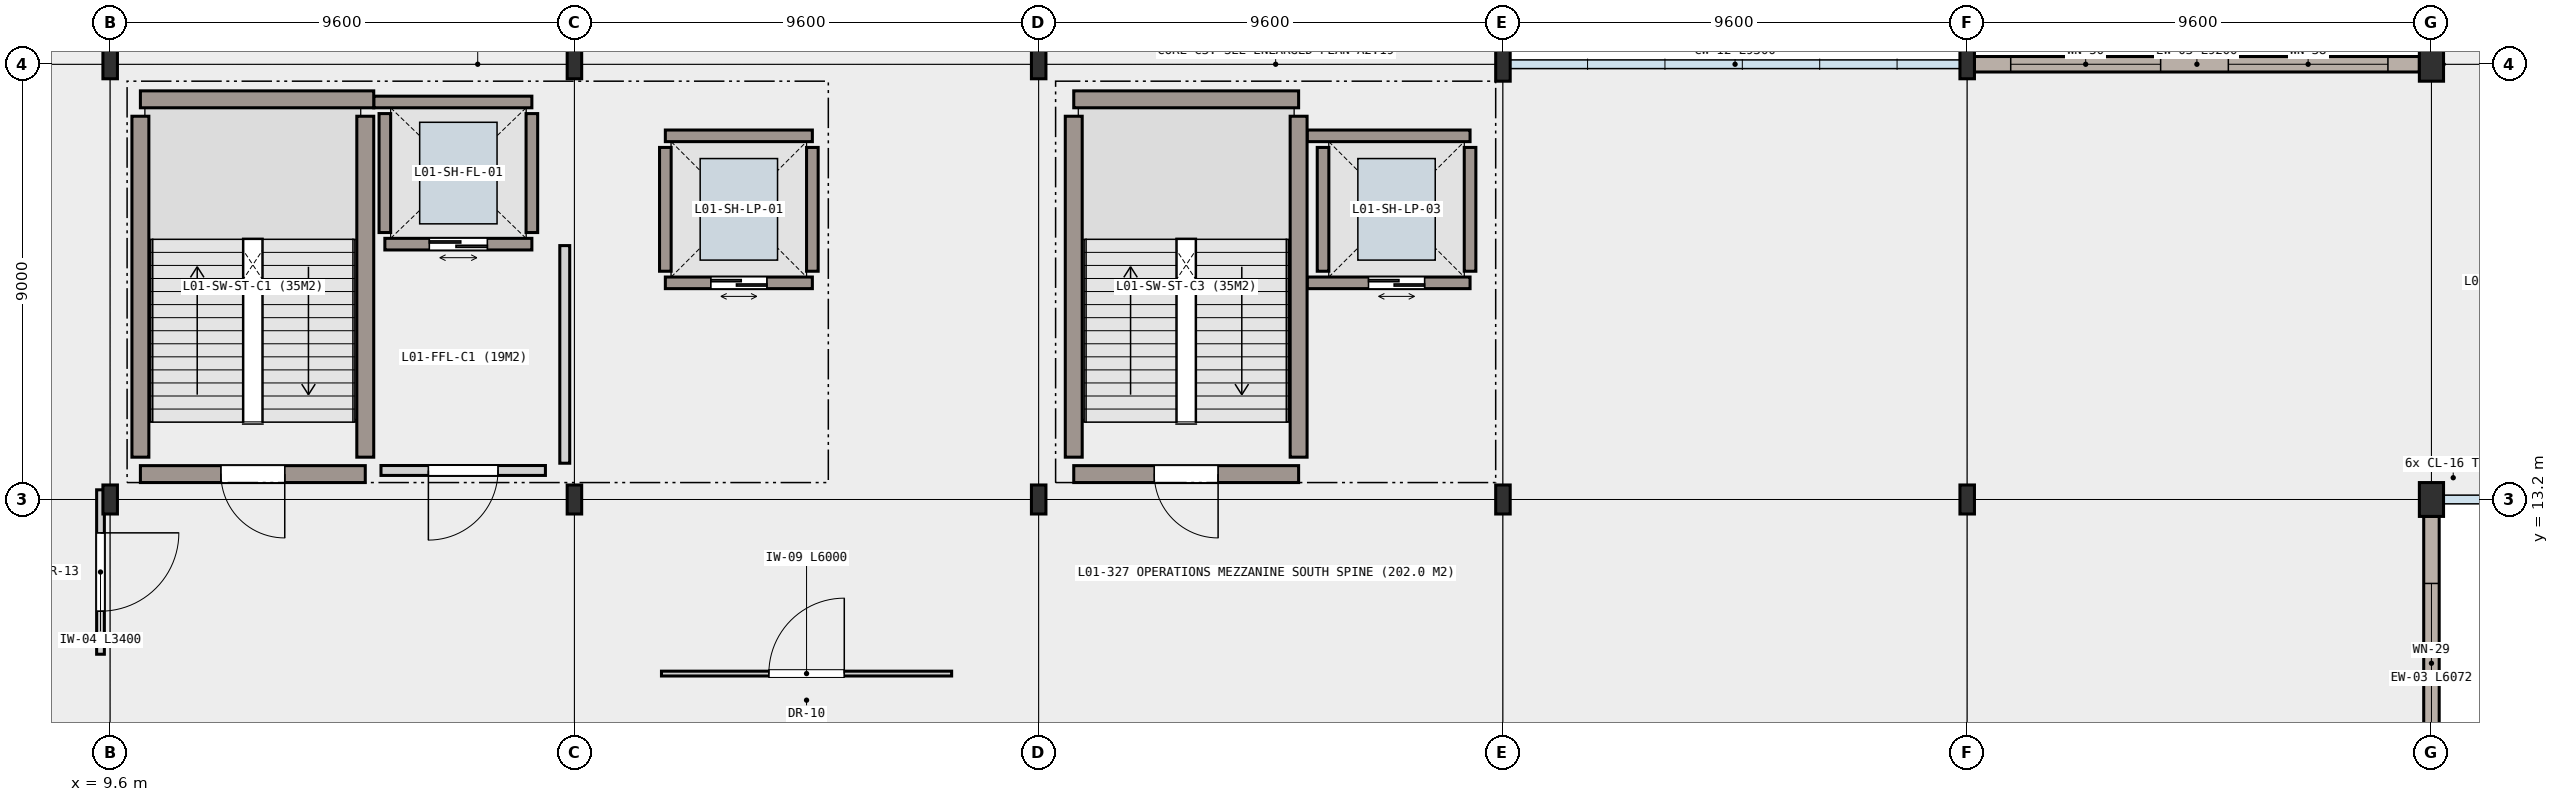
"""IFC4 building model, lengths in metres.
Left out: names, types, materials, properties, quantities, classifications, styles, units other than length and angle.
Written with IfcOpenShell. Run it as: python <this file> out.ifc"""

import sys

from ifc_helpers import new_model, si_unit, direction, frame, frame_2d, origin, origin_2d, place, context, subcontext, project, spatial, rectangle, hollow_rectangle, i_section, extrude, element, fill, save


model = new_model("IFC4")
c1 = context("Model", 3, precision=1e-05, world=origin(), true_north=direction((0.0, 1.0)))
c2 = subcontext(c1, "Body", "Model", "MODEL_VIEW")
j1 = project(units=[si_unit("LENGTHUNIT", "METRE"), si_unit("PLANEANGLEUNIT", "RADIAN")], contexts=[c1])
p1 = place(None, origin())
s1 = spatial("IfcSite", under=j1, at=p1, CompositionType="ELEMENT")
p2 = place(p1, origin())
s2 = spatial("IfcBuilding", under=s1, at=p2, CompositionType="ELEMENT")
p3 = place(p2, frame((0.0, 0.0, 5.4)))
s3 = spatial("IfcBuildingStorey", under=s2, at=p3, CompositionType="ELEMENT", Elevation=5.4)
for number, where, z_axis, x_axis in (
    (1, (9.6, 13.2, 0.0), (0.0, 0.0, 1.0), (1.0, 0.0, 0.0)),
    (2, (9.6, 22.2, 0.0), (0.0, 0.0, 1.0), (1.0, 0.0, 0.0)),
    (3, (19.2, 13.2, 0.0), (0.0, 0.0, 1.0), (1.0, 0.0, 0.0)),
    (4, (19.2, 22.2, 0.0), (0.0, 0.0, 1.0), (1.0, 0.0, 0.0)),
    (5, (28.8, 13.2, 0.0), (0.0, 0.0, 1.0), (1.0, 0.0, 0.0)),
    (6, (28.8, 22.2, 0.0), (0.0, 0.0, 1.0), (1.0, 0.0, 0.0)),
    (7, (38.4, 13.2, 0.0), (0.0, 0.0, 1.0), (1.0, 0.0, 0.0)),
):
    element("IfcColumn", number, at=place(p3, frame(where, z_axis=z_axis, x_axis=x_axis)), inside=s3, PredefinedType="COLUMN", context=c2, shape_type="SweptSolid", body=[
        extrude(i_section(OverallWidth=0.3, OverallDepth=0.6, WebThickness=0.015, FlangeThickness=0.03, FilletRadius=0.027, at=origin_2d()), origin(), (0.0, 0.0, 1.0), 4.8),
    ])
p4 = place(p3, frame((38.4, 22.2, 0.0), z_axis=(0.0, 0.0, 1.0), x_axis=(1.0, 0.0, 0.0)))
e8 = element("IfcColumn", 8, at=p4, inside=s3, PredefinedType="COLUMN", context=c2, shape_type="SweptSolid", body=[
    extrude(i_section(OverallWidth=0.3, OverallDepth=0.7, WebThickness=0.017, FlangeThickness=0.032, FilletRadius=0.027, at=origin_2d()), origin(), (0.0, 0.0, 1.0), 4.8),
])
for number, where, z_axis, x_axis in (
    (9, (48.0, 13.2, 0.0), (0.0, 0.0, 1.0), (1.0, 0.0, 0.0)),
    (10, (48.0, 22.2, 0.0), (0.0, 0.0, 1.0), (1.0, 0.0, 0.0)),
):
    element("IfcColumn", number, at=place(p3, frame(where, z_axis=z_axis, x_axis=x_axis)), inside=s3, PredefinedType="COLUMN", context=c2, shape_type="SweptSolid", body=[
        extrude(i_section(OverallWidth=0.3, OverallDepth=0.6, WebThickness=0.015, FlangeThickness=0.03, FilletRadius=0.027, at=origin_2d()), origin(), (0.0, 0.0, 1.0), 4.8),
    ])
p5 = place(p3, frame((57.6, 13.2, 0.0), z_axis=(0.0, 0.0, 1.0), x_axis=(1.0, 0.0, 0.0)))
e11 = element("IfcColumn", 11, at=p5, inside=s3, PredefinedType="COLUMN", context=c2, shape_type="SweptSolid", body=[
    extrude(hollow_rectangle(XDim=0.5, YDim=0.7, WallThickness=0.032, at=origin_2d()), origin(), (0.0, 0.0, 1.0), 4.788),
])
p6 = place(p3, frame((57.6, 22.2, 0.0), z_axis=(0.0, 0.0, 1.0), x_axis=(1.0, 0.0, 0.0)))
e12 = element("IfcColumn", 12, at=p6, inside=s3, PredefinedType="COLUMN", context=c2, shape_type="SweptSolid", body=[
    extrude(hollow_rectangle(XDim=0.5, YDim=0.7, WallThickness=0.032, at=origin_2d()), origin(), (0.0, 0.0, 1.0), 4.8),
])
p7 = place(p3, frame((48.15, 22.2, 0.0), z_axis=(0.0, 0.0, 1.0), x_axis=(1.0, 0.0, 0.0)))
e13 = element("IfcWall", 13, at=p7, inside=s3, PredefinedType="SOLIDWALL", context=c2, shape_type="SweptSolid", body=[
    extrude(rectangle(XDim=9.2, YDim=0.32, at=frame_2d((4.6, 0.0))), origin(), (0.0, 0.0, 1.0), 3.95),
])
p8 = place(p7, frame((0.75, 0.0, 0.85)))
e14 = element("IfcOpeningElement", 14, at=p8, cuts=e13, PredefinedType="OPENING", context=c2, shape_type="SweptSolid", body=[
    extrude(rectangle(XDim=3.1, YDim=2.15, at=frame_2d((1.55, 1.075))), frame((0.0, 0.17, 0.0), z_axis=(0.0, -1.0, 0.0), x_axis=(1.0, 0.0, 0.0)), (0.0, 0.0, 1.0), 0.34),
])
p9 = place(p7, frame((5.25, 0.0, 0.85)))
e15 = element("IfcOpeningElement", 15, at=p9, cuts=e13, PredefinedType="OPENING", context=c2, shape_type="SweptSolid", body=[
    extrude(rectangle(XDim=3.3, YDim=1.5, at=frame_2d((1.65, 0.75))), frame((0.0, 0.17, 0.0), z_axis=(0.0, -1.0, 0.0), x_axis=(1.0, 0.0, 0.0)), (0.0, 0.0, 1.0), 0.34),
])
p10 = place(p3, frame((57.6, 12.85, 0.0), z_axis=(0.0, 0.0, 1.0), x_axis=(0.0, -1.0, 0.0)))
e16 = element("IfcWall", 16, at=p10, inside=s3, PredefinedType="SOLIDWALL", context=c2, shape_type="SweptSolid", body=[
    extrude(rectangle(XDim=6.072, YDim=0.32, at=frame_2d((3.036, 0.0))), origin(), (0.0, 0.0, 1.0), 4.05),
])
p11 = place(p10, frame((1.386, 0.0, 0.85)))
e17 = element("IfcOpeningElement", 17, at=p11, cuts=e16, PredefinedType="OPENING", context=c2, shape_type="SweptSolid", body=[
    extrude(rectangle(XDim=3.3, YDim=1.85, at=frame_2d((1.65, 0.925))), frame((0.0, 0.17, 0.0), z_axis=(0.0, -1.0, 0.0), x_axis=(1.0, 0.0, 0.0)), (0.0, 0.0, 1.0), 0.34),
])
p12 = place(p3, frame((18.32, 18.48, 0.0), z_axis=(0.0, 0.0, 1.0), x_axis=(-1.0, 0.0, 0.0)))
e18 = element("IfcWall", 18, at=p12, inside=s3, PredefinedType="SHEAR", context=c2, shape_type="SweptSolid", body=[
    extrude(rectangle(XDim=3.04, YDim=0.24, at=frame_2d((1.52, 0.0))), origin(), (0.0, 0.0, 1.0), 4.54),
])
p13 = place(p12, frame((0.92, 0.0, 0.0)))
e19 = element("IfcOpeningElement", 19, at=p13, cuts=e18, PredefinedType="OPENING", context=c2, shape_type="SweptSolid", body=[
    extrude(rectangle(XDim=1.2, YDim=2.15, at=frame_2d((0.6, 1.075))), frame((0.0, 0.13, 0.0), z_axis=(0.0, -1.0, 0.0), x_axis=(1.0, 0.0, 0.0)), (0.0, 0.0, 1.0), 0.26),
])
p14 = place(p3, frame((15.05, 21.42, 0.0), z_axis=(0.0, 0.0, 1.0), x_axis=(1.0, 0.0, 0.0)))
e20 = element("IfcWall", 20, at=p14, inside=s3, PredefinedType="SHEAR", context=c2, shape_type="SweptSolid", body=[
    extrude(rectangle(XDim=3.27, YDim=0.24, at=frame_2d((1.635, 0.0))), origin(), (0.0, 0.0, 1.0), 4.54),
])
for number, where, z_axis, x_axis in (
    (21, (15.28, 18.72, 0.0), (0.0, 0.0, 1.0), (0.0, 1.0, 0.0)),
    (22, (18.32, 21.18, 0.0), (0.0, 0.0, 1.0), (0.0, -1.0, 0.0)),
):
    element("IfcWall", number, at=place(p3, frame(where, z_axis=z_axis, x_axis=x_axis)), inside=s3, PredefinedType="SHEAR", context=c2, shape_type="SweptSolid", body=[
        extrude(rectangle(XDim=2.46, YDim=0.24, at=frame_2d((1.23, 0.0))), origin(), (0.0, 0.0, 1.0), 4.54),
    ])
p15 = place(p3, frame((24.12, 17.68, 0.0), z_axis=(0.0, 0.0, 1.0), x_axis=(-1.0, 0.0, 0.0)))
e23 = element("IfcWall", 23, at=p15, inside=s3, PredefinedType="SHEAR", context=c2, shape_type="SweptSolid", body=[
    extrude(rectangle(XDim=3.04, YDim=0.24, at=frame_2d((1.52, 0.0))), origin(), (0.0, 0.0, 1.0), 4.54),
])
p16 = place(p15, frame((0.94, 0.0, 0.0)))
e24 = element("IfcOpeningElement", 24, at=p16, cuts=e23, PredefinedType="OPENING", context=c2, shape_type="SweptSolid", body=[
    extrude(rectangle(XDim=1.16, YDim=2.15, at=frame_2d((0.58, 1.075))), frame((0.0, 0.13, 0.0), z_axis=(0.0, -1.0, 0.0), x_axis=(1.0, 0.0, 0.0)), (0.0, 0.0, 1.0), 0.26),
])
p17 = place(p3, frame((21.08, 20.72, 0.0), z_axis=(0.0, 0.0, 1.0), x_axis=(1.0, 0.0, 0.0)))
e25 = element("IfcWall", 25, at=p17, inside=s3, PredefinedType="SHEAR", context=c2, shape_type="SweptSolid", body=[
    extrude(rectangle(XDim=3.04, YDim=0.24, at=frame_2d((1.52, 0.0))), origin(), (0.0, 0.0, 1.0), 4.54),
])
for number, where, z_axis, x_axis in (
    (26, (21.08, 17.92, 0.0), (0.0, 0.0, 1.0), (0.0, 1.0, 0.0)),
    (27, (24.12, 20.48, 0.0), (0.0, 0.0, 1.0), (0.0, -1.0, 0.0)),
):
    element("IfcWall", number, at=place(p3, frame(where, z_axis=z_axis, x_axis=x_axis)), inside=s3, PredefinedType="SHEAR", context=c2, shape_type="SweptSolid", body=[
        extrude(rectangle(XDim=2.56, YDim=0.24, at=frame_2d((1.28, 0.0))), origin(), (0.0, 0.0, 1.0), 4.54),
    ])
p18 = place(p3, frame((37.72, 17.68, 0.0), z_axis=(0.0, 0.0, 1.0), x_axis=(-1.0, 0.0, 0.0)))
e28 = element("IfcWall", 28, at=p18, inside=s3, PredefinedType="SHEAR", context=c2, shape_type="SweptSolid", body=[
    extrude(rectangle(XDim=3.37, YDim=0.24, at=frame_2d((1.685, 0.0))), origin(), (0.0, 0.0, 1.0), 4.54),
])
p19 = place(p18, frame((0.94, 0.0, 0.0)))
e29 = element("IfcOpeningElement", 29, at=p19, cuts=e28, PredefinedType="OPENING", context=c2, shape_type="SweptSolid", body=[
    extrude(rectangle(XDim=1.16, YDim=2.15, at=frame_2d((0.58, 1.075))), frame((0.0, 0.13, 0.0), z_axis=(0.0, -1.0, 0.0), x_axis=(1.0, 0.0, 0.0)), (0.0, 0.0, 1.0), 0.26),
])
p20 = place(p3, frame((34.35, 20.72, 0.0), z_axis=(0.0, 0.0, 1.0), x_axis=(1.0, 0.0, 0.0)))
e30 = element("IfcWall", 30, at=p20, inside=s3, PredefinedType="SHEAR", context=c2, shape_type="SweptSolid", body=[
    extrude(rectangle(XDim=3.37, YDim=0.24, at=frame_2d((1.685, 0.0))), origin(), (0.0, 0.0, 1.0), 4.54),
])
for number, where, z_axis, x_axis in (
    (31, (34.68, 17.92, 0.0), (0.0, 0.0, 1.0), (0.0, 1.0, 0.0)),
    (32, (37.72, 20.48, 0.0), (0.0, 0.0, 1.0), (0.0, -1.0, 0.0)),
):
    element("IfcWall", number, at=place(p3, frame(where, z_axis=z_axis, x_axis=x_axis)), inside=s3, PredefinedType="SHEAR", context=c2, shape_type="SweptSolid", body=[
        extrude(rectangle(XDim=2.56, YDim=0.24, at=frame_2d((1.28, 0.0))), origin(), (0.0, 0.0, 1.0), 4.54),
    ])
p21 = place(p3, frame((14.875, 13.725, 0.0), z_axis=(0.0, 0.0, 1.0), x_axis=(-1.0, 0.0, 0.0)))
e33 = element("IfcWall", 33, at=p21, inside=s3, PredefinedType="SHEAR", context=c2, shape_type="SweptSolid", body=[
    extrude(rectangle(XDim=4.65, YDim=0.35, at=frame_2d((2.325, 0.0))), origin(), (0.0, 0.0, 1.0), 4.54),
])
p22 = place(p21, frame((1.665, 0.0, 0.0)))
e34 = element("IfcOpeningElement", 34, at=p22, cuts=e33, PredefinedType="OPENING", context=c2, shape_type="SweptSolid", body=[
    extrude(rectangle(XDim=1.32, YDim=2.15, at=frame_2d((0.66, 1.075))), frame((0.0, 0.185, 0.0), z_axis=(0.0, -1.0, 0.0), x_axis=(1.0, 0.0, 0.0)), (0.0, 0.0, 1.0), 0.37),
])
p23 = place(p3, frame((10.225, 21.475, 0.0), z_axis=(0.0, 0.0, 1.0), x_axis=(1.0, 0.0, 0.0)))
e35 = element("IfcWall", 35, at=p23, inside=s3, PredefinedType="SHEAR", context=c2, shape_type="SweptSolid", body=[
    extrude(rectangle(XDim=4.825, YDim=0.35, at=frame_2d((2.413, 0.0))), origin(), (0.0, 0.0, 1.0), 4.54),
])
for number, where, z_axis, x_axis in (
    (36, (10.225, 14.075, 0.0), (0.0, 0.0, 1.0), (0.0, 1.0, 0.0)),
    (37, (14.875, 21.125, 0.0), (0.0, 0.0, 1.0), (0.0, -1.0, 0.0)),
):
    element("IfcWall", number, at=place(p3, frame(where, z_axis=z_axis, x_axis=x_axis)), inside=s3, PredefinedType="SHEAR", context=c2, shape_type="SweptSolid", body=[
        extrude(rectangle(XDim=7.05, YDim=0.35, at=frame_2d((3.525, 0.0))), origin(), (0.0, 0.0, 1.0), 4.54),
    ])
p24 = place(p3, frame((34.175, 13.725, 0.0), z_axis=(0.0, 0.0, 1.0), x_axis=(-1.0, 0.0, 0.0)))
e38 = element("IfcWall", 38, at=p24, inside=s3, PredefinedType="SHEAR", context=c2, shape_type="SweptSolid", body=[
    extrude(rectangle(XDim=4.65, YDim=0.35, at=frame_2d((2.325, 0.0))), origin(), (0.0, 0.0, 1.0), 4.54),
])
p25 = place(p24, frame((1.665, 0.0, 0.0)))
e39 = element("IfcOpeningElement", 39, at=p25, cuts=e38, PredefinedType="OPENING", context=c2, shape_type="SweptSolid", body=[
    extrude(rectangle(XDim=1.32, YDim=2.15, at=frame_2d((0.66, 1.075))), frame((0.0, 0.185, 0.0), z_axis=(0.0, -1.0, 0.0), x_axis=(1.0, 0.0, 0.0)), (0.0, 0.0, 1.0), 0.37),
])
p26 = place(p3, frame((29.525, 21.475, 0.0), z_axis=(0.0, 0.0, 1.0), x_axis=(1.0, 0.0, 0.0)))
e40 = element("IfcWall", 40, at=p26, inside=s3, PredefinedType="SHEAR", context=c2, shape_type="SweptSolid", body=[
    extrude(rectangle(XDim=4.65, YDim=0.35, at=frame_2d((2.325, 0.0))), origin(), (0.0, 0.0, 1.0), 4.54),
])
for number, where, z_axis, x_axis in (
    (41, (29.525, 14.075, 0.0), (0.0, 0.0, 1.0), (0.0, 1.0, 0.0)),
    (42, (34.175, 21.125, 0.0), (0.0, 0.0, 1.0), (0.0, -1.0, 0.0)),
):
    element("IfcWall", number, at=place(p3, frame(where, z_axis=z_axis, x_axis=x_axis)), inside=s3, PredefinedType="SHEAR", context=c2, shape_type="SweptSolid", body=[
        extrude(rectangle(XDim=7.05, YDim=0.35, at=frame_2d((3.525, 0.0))), origin(), (0.0, 0.0, 1.0), 4.54),
    ])
p27 = place(p3, frame((18.6, 13.8, 0.0), z_axis=(0.0, 0.0, 1.0), x_axis=(-1.0, 0.0, 0.0)))
e43 = element("IfcWall", 43, at=p27, inside=s3, PredefinedType="PARTITIONING", context=c2, shape_type="SweptSolid", body=[
    extrude(rectangle(XDim=3.4, YDim=0.205, at=frame_2d((1.7, 0.0))), origin(), (0.0, 0.0, 1.0), 4.54),
])
p28 = place(p27, frame((0.98, 0.0, 0.0)))
e44 = element("IfcOpeningElement", 44, at=p28, cuts=e43, PredefinedType="OPENING", context=c2, shape_type="SweptSolid", body=[
    extrude(rectangle(XDim=1.44, YDim=2.18, at=frame_2d((0.72, 1.09))), frame((0.0, 0.113, 0.0), z_axis=(0.0, -1.0, 0.0), x_axis=(1.0, 0.0, 0.0)), (0.0, 0.0, 1.0), 0.225),
])
p29 = place(p3, frame((19.0, 18.45, 0.0), z_axis=(0.0, 0.0, 1.0), x_axis=(0.0, -1.0, 0.0)))
e45 = element("IfcWall", 45, at=p29, inside=s3, PredefinedType="PARTITIONING", context=c2, shape_type="SweptSolid", body=[
    extrude(rectangle(XDim=4.5, YDim=0.205, at=frame_2d((2.25, 0.0))), origin(), (0.0, 0.0, 1.0), 3.96),
])
p30 = place(p3, frame((21.0, 9.6, 0.0), z_axis=(0.0, 0.0, 1.0), x_axis=(1.0, 0.0, 0.0)))
e46 = element("IfcWall", 46, at=p30, inside=s3, PredefinedType="PARTITIONING", context=c2, shape_type="SweptSolid", body=[
    extrude(rectangle(XDim=6.0, YDim=0.1, at=frame_2d((3.0, 0.0))), origin(), (0.0, 0.0, 1.0), 4.54),
])
p31 = place(p30, frame((2.22, 0.0, 0.0)))
e47 = element("IfcOpeningElement", 47, at=p31, cuts=e46, PredefinedType="OPENING", context=c2, shape_type="SweptSolid", body=[
    extrude(rectangle(XDim=1.56, YDim=2.2, at=frame_2d((0.78, 1.1))), frame((0.0, 0.06, 0.0), z_axis=(0.0, -1.0, 0.0), x_axis=(1.0, 0.0, 0.0)), (0.0, 0.0, 1.0), 0.12),
])
p32 = place(p3, frame((9.4, 13.4, 0.0), z_axis=(0.0, 0.0, 1.0), x_axis=(0.0, -1.0, 0.0)))
e48 = element("IfcWall", 48, at=p32, inside=s3, PredefinedType="PARTITIONING", context=c2, shape_type="SweptSolid", body=[
    extrude(rectangle(XDim=3.4, YDim=0.16, at=frame_2d((1.7, 0.0))), origin(), (0.0, 0.0, 1.0), 4.01),
])
p33 = place(p32, frame((0.89, 0.0, 0.0)))
e49 = element("IfcOpeningElement", 49, at=p33, cuts=e48, PredefinedType="OPENING", context=c2, shape_type="SweptSolid", body=[
    extrude(rectangle(XDim=1.62, YDim=2.22, at=frame_2d((0.81, 1.11))), frame((0.0, 0.09, 0.0), z_axis=(0.0, -1.0, 0.0), x_axis=(1.0, 0.0, 0.0)), (0.0, 0.0, 1.0), 0.18),
])
p34 = place(p8, origin())
e50 = element("IfcWindow", 50, at=p34, inside=s3, PartitioningType="SINGLE_PANEL", PredefinedType="WINDOW", context=c2, shape_type="SweptSolid", body=[
    extrude(rectangle(XDim=3.1, YDim=2.15, at=frame_2d((1.55, 1.075))), frame((0.0, 0.03, 0.0), z_axis=(0.0, -1.0, 0.0), x_axis=(1.0, 0.0, 0.0)), (0.0, 0.0, 1.0), 0.06),
])
fill(e14, e50)
p35 = place(p9, origin())
e51 = element("IfcWindow", 51, at=p35, inside=s3, PartitioningType="SINGLE_PANEL", PredefinedType="WINDOW", context=c2, shape_type="SweptSolid", body=[
    extrude(rectangle(XDim=3.3, YDim=1.5, at=frame_2d((1.65, 0.75))), frame((0.0, 0.03, 0.0), z_axis=(0.0, -1.0, 0.0), x_axis=(1.0, 0.0, 0.0)), (0.0, 0.0, 1.0), 0.06),
])
fill(e15, e51)
p36 = place(p11, origin())
e52 = element("IfcWindow", 52, at=p36, inside=s3, PartitioningType="SINGLE_PANEL", PredefinedType="WINDOW", context=c2, shape_type="SweptSolid", body=[
    extrude(rectangle(XDim=3.3, YDim=1.85, at=frame_2d((1.65, 0.925))), frame((0.0, 0.03, 0.0), z_axis=(0.0, -1.0, 0.0), x_axis=(1.0, 0.0, 0.0)), (0.0, 0.0, 1.0), 0.06),
])
fill(e17, e52)
p37 = place(p13, origin())
e53 = element("IfcDoor", 53, at=p37, inside=s3, OperationType="DOUBLE_DOOR_SLIDING", PredefinedType="DOOR", context=c2, shape_type="SweptSolid", body=[
    extrude(rectangle(XDim=1.2, YDim=2.15, at=frame_2d((0.6, 1.075))), frame((0.0, 0.025, 0.0), z_axis=(0.0, -1.0, 0.0), x_axis=(1.0, 0.0, 0.0)), (0.0, 0.0, 1.0), 0.05),
])
fill(e19, e53)
p38 = place(p16, origin())
e54 = element("IfcDoor", 54, at=p38, inside=s3, OperationType="DOUBLE_DOOR_SLIDING", PredefinedType="DOOR", context=c2, shape_type="SweptSolid", body=[
    extrude(rectangle(XDim=1.16, YDim=2.15, at=frame_2d((0.58, 1.075))), frame((0.0, 0.025, 0.0), z_axis=(0.0, -1.0, 0.0), x_axis=(1.0, 0.0, 0.0)), (0.0, 0.0, 1.0), 0.05),
])
fill(e24, e54)
p39 = place(p19, origin())
e55 = element("IfcDoor", 55, at=p39, inside=s3, OperationType="DOUBLE_DOOR_SLIDING", PredefinedType="DOOR", context=c2, shape_type="SweptSolid", body=[
    extrude(rectangle(XDim=1.16, YDim=2.15, at=frame_2d((0.58, 1.075))), frame((0.0, 0.025, 0.0), z_axis=(0.0, -1.0, 0.0), x_axis=(1.0, 0.0, 0.0)), (0.0, 0.0, 1.0), 0.05),
])
fill(e29, e55)
p40 = place(p22, origin())
e56 = element("IfcDoor", 56, at=p40, inside=s3, OperationType="SINGLE_SWING_LEFT", PredefinedType="DOOR", context=c2, shape_type="SweptSolid", body=[
    extrude(rectangle(XDim=1.32, YDim=2.15, at=frame_2d((0.66, 1.075))), frame((0.0, 0.025, 0.0), z_axis=(0.0, -1.0, 0.0), x_axis=(1.0, 0.0, 0.0)), (0.0, 0.0, 1.0), 0.05),
])
fill(e34, e56)
p41 = place(p25, origin())
e57 = element("IfcDoor", 57, at=p41, inside=s3, OperationType="SINGLE_SWING_LEFT", PredefinedType="DOOR", context=c2, shape_type="SweptSolid", body=[
    extrude(rectangle(XDim=1.32, YDim=2.15, at=frame_2d((0.66, 1.075))), frame((0.0, 0.025, 0.0), z_axis=(0.0, -1.0, 0.0), x_axis=(1.0, 0.0, 0.0)), (0.0, 0.0, 1.0), 0.05),
])
fill(e39, e57)
p42 = place(p28, origin())
e58 = element("IfcDoor", 58, at=p42, inside=s3, OperationType="SINGLE_SWING_RIGHT", PredefinedType="DOOR", context=c2, shape_type="SweptSolid", body=[
    extrude(rectangle(XDim=1.44, YDim=2.18, at=frame_2d((0.72, 1.09))), frame((0.0, 0.025, 0.0), z_axis=(0.0, -1.0, 0.0), x_axis=(1.0, 0.0, 0.0)), (0.0, 0.0, 1.0), 0.05),
])
fill(e44, e58)
p43 = place(p31, origin())
e59 = element("IfcDoor", 59, at=p43, inside=s3, OperationType="SINGLE_SWING_RIGHT", PredefinedType="DOOR", context=c2, shape_type="SweptSolid", body=[
    extrude(rectangle(XDim=1.56, YDim=2.2, at=frame_2d((0.78, 1.1))), frame((0.0, 0.025, 0.0), z_axis=(0.0, -1.0, 0.0), x_axis=(1.0, 0.0, 0.0)), (0.0, 0.0, 1.0), 0.05),
])
fill(e47, e59)
p44 = place(p33, origin())
e60 = element("IfcDoor", 60, at=p44, inside=s3, OperationType="SINGLE_SWING_LEFT", PredefinedType="DOOR", context=c2, shape_type="SweptSolid", body=[
    extrude(rectangle(XDim=1.62, YDim=2.22, at=frame_2d((0.81, 1.11))), frame((0.0, 0.025, 0.0), z_axis=(0.0, -1.0, 0.0), x_axis=(1.0, 0.0, 0.0)), (0.0, 0.0, 1.0), 0.05),
])
fill(e49, e60)
save(model, sys.argv[1])
